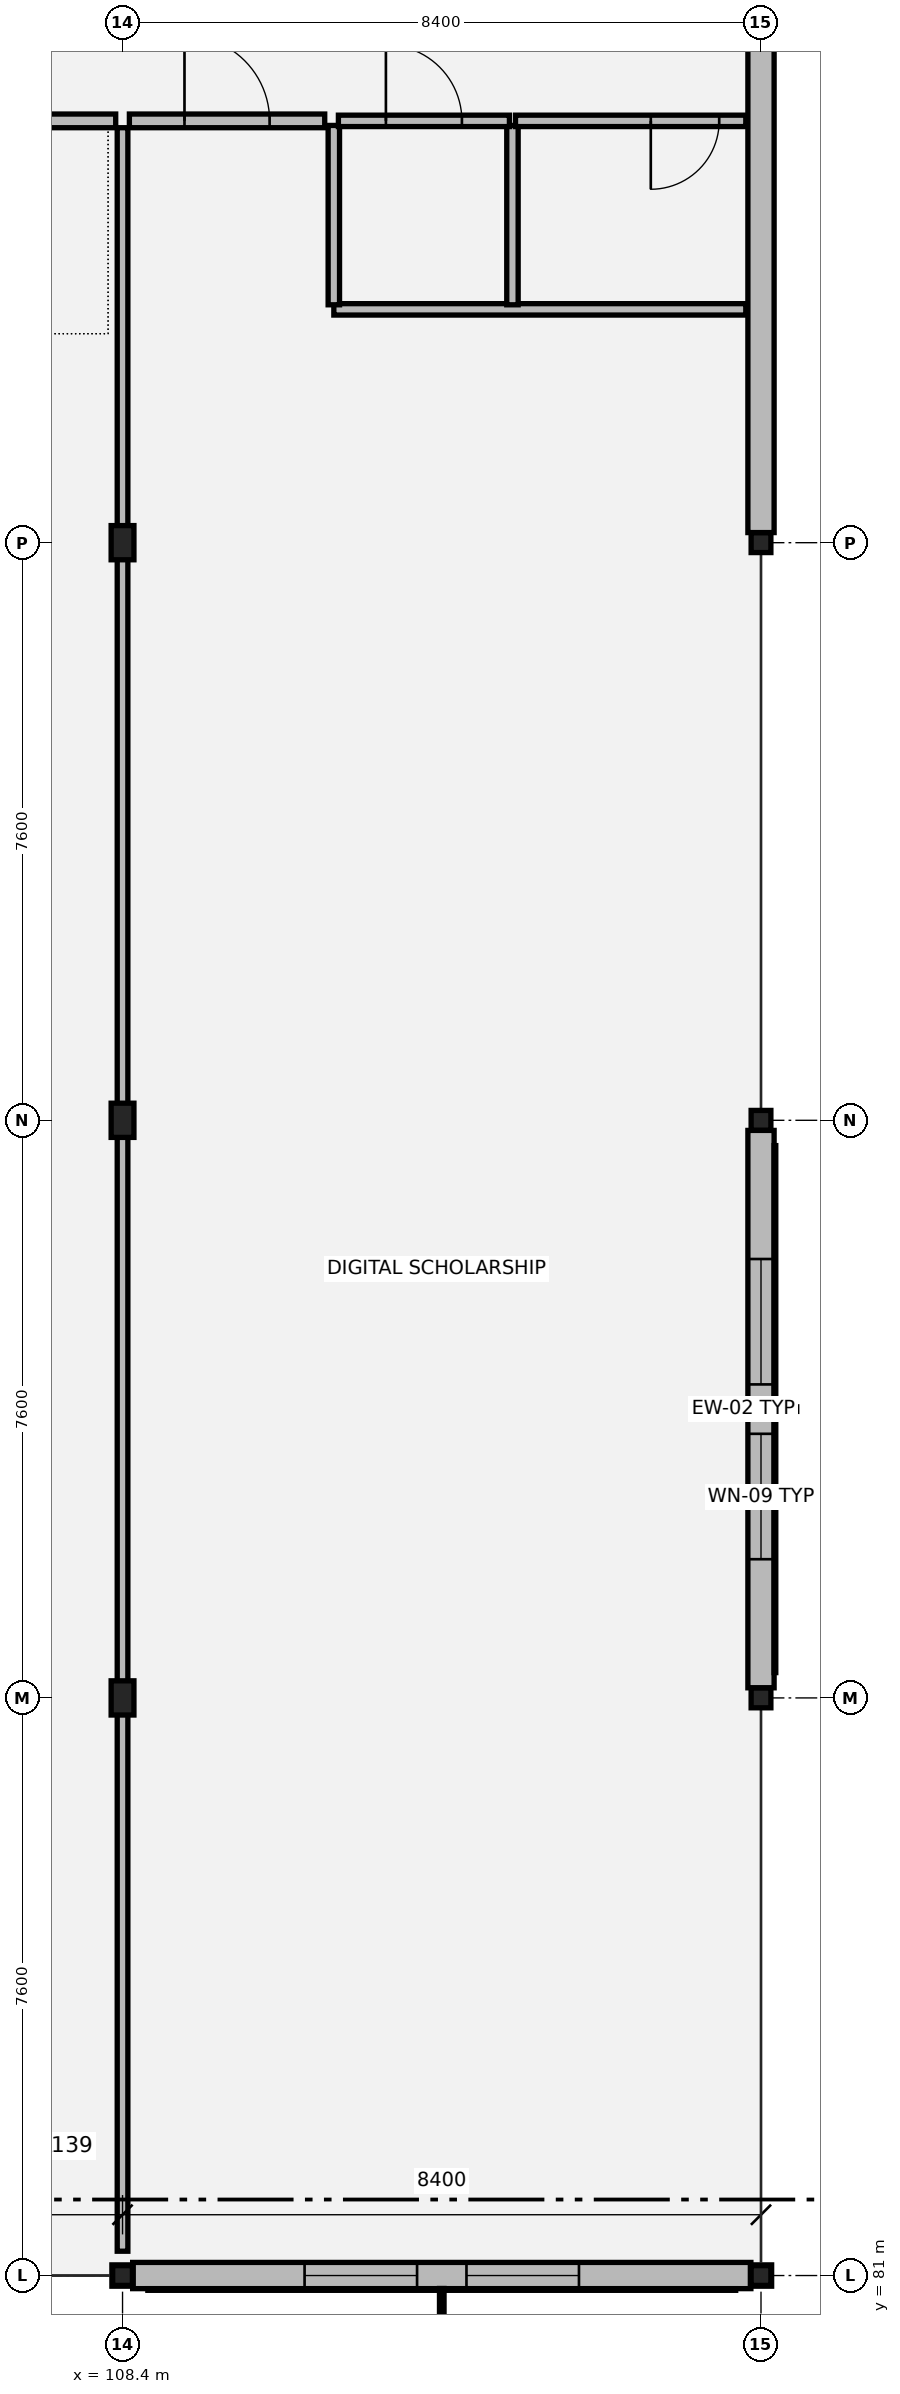
"""IFC4 building model, lengths in metres.
Left out: names, types, materials, properties, quantities, classifications, styles, units other than length and angle.
Written with IfcOpenShell. Run it as: python <this file> out.ifc"""

import sys

from ifc_helpers import new_model, si_unit, direction, frame, frame_2d, origin, origin_2d, place, context, subcontext, project, spatial, rectangle, hollow_rectangle, i_section, extrude, element, fill, save


model = new_model("IFC4")
c1 = context("Model", 3, precision=1e-05, world=origin(), true_north=direction((0.0, 1.0)))
c2 = subcontext(c1, "Body", "Model", "MODEL_VIEW")
j1 = project(units=[si_unit("LENGTHUNIT", "METRE"), si_unit("PLANEANGLEUNIT", "RADIAN")], contexts=[c1])
p1 = place(None, origin())
s1 = spatial("IfcSite", under=j1, at=p1, CompositionType="ELEMENT")
p2 = place(p1, origin())
s2 = spatial("IfcBuilding", under=s1, at=p2, CompositionType="ELEMENT")
p3 = place(p2, frame((0.0, 0.0, 9.18)))
s3 = spatial("IfcBuildingStorey", under=s2, at=p3, CompositionType="ELEMENT", Elevation=9.18)
p4 = place(p3, frame((108.4, 81.0, 0.0), z_axis=(0.0, 0.0, 1.0), x_axis=(1.0, 0.0, 0.0)))
e1 = element("IfcColumn", 1, at=p4, inside=s3, PredefinedType="COLUMN", context=c2, shape_type="SweptSolid", body=[
    extrude(hollow_rectangle(XDim=0.26, YDim=0.26, WallThickness=0.012, at=origin_2d()), origin(), (0.0, 0.0, 1.0), 3.875),
])
for number, where, z_axis, x_axis in (
    (2, (108.4, 88.6, 0.0), (0.0, 0.0, 1.0), (1.0, 0.0, 0.0)),
    (3, (108.4, 96.2, 0.0), (0.0, 0.0, 1.0), (1.0, 0.0, 0.0)),
    (4, (108.4, 103.8, 0.0), (0.0, 0.0, 1.0), (1.0, 0.0, 0.0)),
):
    element("IfcColumn", number, at=place(p3, frame(where, z_axis=z_axis, x_axis=x_axis)), inside=s3, PredefinedType="COLUMN", context=c2, shape_type="SweptSolid", body=[
        extrude(i_section(OverallWidth=0.3, OverallDepth=0.45, WebThickness=0.014, FlangeThickness=0.026, at=origin_2d()), origin(), (0.0, 0.0, 1.0), 4.055),
    ])
p5 = place(p3, frame((116.8, 81.0, 0.0), z_axis=(0.0, 0.0, 1.0), x_axis=(1.0, 0.0, 0.0)))
e5 = element("IfcColumn", 5, at=p5, inside=s3, PredefinedType="COLUMN", context=c2, shape_type="SweptSolid", body=[
    extrude(hollow_rectangle(XDim=0.26, YDim=0.26, WallThickness=0.012, at=origin_2d()), origin(), (0.0, 0.0, 1.0), 3.875),
])
for number, where, z_axis, x_axis in (
    (6, (116.8, 88.6, 0.0), (0.0, 0.0, 1.0), (1.0, 0.0, 0.0)),
    (7, (116.8, 96.2, 0.0), (0.0, 0.0, 1.0), (1.0, 0.0, 0.0)),
    (8, (116.8, 103.8, 0.0), (0.0, 0.0, 1.0), (1.0, 0.0, 0.0)),
):
    element("IfcColumn", number, at=place(p3, frame(where, z_axis=z_axis, x_axis=x_axis)), inside=s3, PredefinedType="COLUMN", context=c2, shape_type="SweptSolid", body=[
        extrude(hollow_rectangle(XDim=0.26, YDim=0.26, WallThickness=0.012, at=origin_2d()), origin(), (0.0, 0.0, 1.0), 4.055),
    ])
p6 = place(p3, frame((108.533, 81.0, 0.0), z_axis=(0.0, 0.0, 1.0), x_axis=(1.0, 0.0, 0.0)))
e9 = element("IfcWall", 9, at=p6, inside=s3, PredefinedType="SOLIDWALL", context=c2, shape_type="SweptSolid", body=[
    extrude(rectangle(XDim=8.134, YDim=0.345, at=frame_2d((4.067, 0.0))), origin(), (0.0, 0.0, 1.0), 3.48),
])
p7 = place(p6, frame((2.262, 0.0, 0.8)))
e10 = element("IfcOpeningElement", 10, at=p7, cuts=e9, PredefinedType="OPENING", context=c2, shape_type="SweptSolid", body=[
    extrude(rectangle(XDim=1.48, YDim=2.16, at=frame_2d((0.74, 1.08))), frame((0.0, 0.182, 0.0), z_axis=(0.0, -1.0, 0.0), x_axis=(1.0, 0.0, 0.0)), (0.0, 0.0, 1.0), 0.365),
])
p8 = place(p6, frame((4.392, 0.0, 0.8)))
e11 = element("IfcOpeningElement", 11, at=p8, cuts=e9, PredefinedType="OPENING", context=c2, shape_type="SweptSolid", body=[
    extrude(rectangle(XDim=1.48, YDim=2.16, at=frame_2d((0.74, 1.08))), frame((0.0, 0.182, 0.0), z_axis=(0.0, -1.0, 0.0), x_axis=(1.0, 0.0, 0.0)), (0.0, 0.0, 1.0), 0.365),
])
p9 = place(p3, frame((116.8, 88.733, 0.0), z_axis=(0.0, 0.0, 1.0), x_axis=(0.0, 1.0, 0.0)))
e12 = element("IfcWall", 12, at=p9, inside=s3, PredefinedType="SOLIDWALL", context=c2, shape_type="SweptSolid", body=[
    extrude(rectangle(XDim=7.334, YDim=0.345, at=frame_2d((3.667, 0.0))), origin(), (0.0, 0.0, 1.0), 3.48),
])
p10 = place(p9, frame((1.692, 0.0, 0.8)))
e13 = element("IfcOpeningElement", 13, at=p10, cuts=e12, PredefinedType="OPENING", context=c2, shape_type="SweptSolid", body=[
    extrude(rectangle(XDim=1.65, YDim=2.25, at=frame_2d((0.825, 1.125))), frame((0.0, 0.182, 0.0), z_axis=(0.0, -1.0, 0.0), x_axis=(1.0, 0.0, 0.0)), (0.0, 0.0, 1.0), 0.365),
])
p11 = place(p9, frame((3.992, 0.0, 0.8)))
e14 = element("IfcOpeningElement", 14, at=p11, cuts=e12, PredefinedType="OPENING", context=c2, shape_type="SweptSolid", body=[
    extrude(rectangle(XDim=1.65, YDim=2.25, at=frame_2d((0.825, 1.125))), frame((0.0, 0.182, 0.0), z_axis=(0.0, -1.0, 0.0), x_axis=(1.0, 0.0, 0.0)), (0.0, 0.0, 1.0), 0.365),
])
p12 = place(p3, frame((116.8, 103.933, 0.0), z_axis=(0.0, 0.0, 1.0), x_axis=(0.0, 1.0, 0.0)))
e15 = element("IfcWall", 15, at=p12, inside=s3, PredefinedType="SOLIDWALL", context=c2, shape_type="SweptSolid", body=[
    extrude(rectangle(XDim=7.334, YDim=0.345, at=frame_2d((3.667, 0.0))), origin(), (0.0, 0.0, 1.0), 3.48),
])
p13 = place(p3, frame((111.18, 106.87, 0.0), z_axis=(0.0, 0.0, 1.0), x_axis=(1.0, 0.0, 0.0)))
e16 = element("IfcWall", 16, at=p13, inside=s3, PredefinedType="PARTITIONING", context=c2, shape_type="SweptSolid", body=[
    extrude(rectangle(XDim=5.42, YDim=0.15, at=frame_2d((2.71, 0.0))), origin(), (0.0, 0.0, 1.0), 3.18),
])
for number, where, z_axis, x_axis in (
    (17, (111.18, 106.93, 0.0), (0.0, 0.0, 1.0), (0.0, 1.0, 0.0)),
    (18, (113.53, 106.93, 0.0), (0.0, 0.0, 1.0), (0.0, 1.0, 0.0)),
):
    element("IfcWall", number, at=place(p3, frame(where, z_axis=z_axis, x_axis=x_axis)), inside=s3, PredefinedType="PARTITIONING", context=c2, shape_type="SweptSolid", body=[
        extrude(rectangle(XDim=2.36, YDim=0.15, at=frame_2d((1.18, 0.0))), origin(), (0.0, 0.0, 1.0), 3.18),
    ])
p14 = place(p3, frame((111.24, 109.35, 0.0), z_axis=(0.0, 0.0, 1.0), x_axis=(1.0, 0.0, 0.0)))
e19 = element("IfcWall", 19, at=p14, inside=s3, PredefinedType="PARTITIONING", context=c2, shape_type="SweptSolid", body=[
    extrude(rectangle(XDim=2.25, YDim=0.15, at=frame_2d((1.125, 0.0))), origin(), (0.0, 0.0, 1.0), 3.18),
])
p15 = place(p14, frame((0.625, 0.0, 0.0)))
e20 = element("IfcOpeningElement", 20, at=p15, cuts=e19, PredefinedType="OPENING", context=c2, shape_type="SweptSolid", body=[
    extrude(rectangle(XDim=1.0, YDim=2.15, at=frame_2d((0.5, 1.075))), frame((0.0, 0.085, 0.0), z_axis=(0.0, -1.0, 0.0), x_axis=(1.0, 0.0, 0.0)), (0.0, 0.0, 1.0), 0.17),
])
p16 = place(p3, frame((113.57, 109.35, 0.0), z_axis=(0.0, 0.0, 1.0), x_axis=(1.0, 0.0, 0.0)))
e21 = element("IfcWall", 21, at=p16, inside=s3, PredefinedType="PARTITIONING", context=c2, shape_type="SweptSolid", body=[
    extrude(rectangle(XDim=3.03, YDim=0.15, at=frame_2d((1.515, 0.0))), origin(), (0.0, 0.0, 1.0), 3.18),
])
p17 = place(p16, frame((1.78, 0.0, 0.0)))
e22 = element("IfcOpeningElement", 22, at=p17, cuts=e21, PredefinedType="OPENING", context=c2, shape_type="SweptSolid", body=[
    extrude(rectangle(XDim=0.9, YDim=2.15, at=frame_2d((0.45, 1.075))), frame((0.0, 0.085, 0.0), z_axis=(0.0, -1.0, 0.0), x_axis=(1.0, 0.0, 0.0)), (0.0, 0.0, 1.0), 0.17),
])
p18 = place(p3, frame((91.69, 109.35, 0.0), z_axis=(0.0, 0.0, 1.0), x_axis=(1.0, 0.0, 0.0)))
e23 = element("IfcWall", 23, at=p18, inside=s3, PredefinedType="PARTITIONING", context=c2, shape_type="SweptSolid", body=[
    extrude(rectangle(XDim=16.62, YDim=0.18, at=frame_2d((8.31, 0.0))), origin(), (0.0, 0.0, 1.0), 3.18),
])
p19 = place(p18, frame((7.68, 0.0, 0.0)))
e24 = element("IfcOpeningElement", 24, at=p19, cuts=e23, PredefinedType="OPENING", context=c2, shape_type="SweptSolid", body=[
    extrude(rectangle(XDim=1.26, YDim=2.2, at=frame_2d((0.63, 1.1))), frame((0.0, 0.1, 0.0), z_axis=(0.0, -1.0, 0.0), x_axis=(1.0, 0.0, 0.0)), (0.0, 0.0, 1.0), 0.2),
])
p20 = place(p3, frame((108.49, 109.35, 0.0), z_axis=(0.0, 0.0, 1.0), x_axis=(1.0, 0.0, 0.0)))
e25 = element("IfcWall", 25, at=p20, inside=s3, PredefinedType="PARTITIONING", context=c2, shape_type="SweptSolid", body=[
    extrude(rectangle(XDim=2.57, YDim=0.18, at=frame_2d((1.285, 0.0))), origin(), (0.0, 0.0, 1.0), 3.18),
])
p21 = place(p20, frame((0.725, 0.0, 0.0)))
e26 = element("IfcOpeningElement", 26, at=p21, cuts=e25, PredefinedType="OPENING", context=c2, shape_type="SweptSolid", body=[
    extrude(rectangle(XDim=1.12, YDim=2.15, at=frame_2d((0.56, 1.075))), frame((0.0, 0.1, 0.0), z_axis=(0.0, -1.0, 0.0), x_axis=(1.0, 0.0, 0.0)), (0.0, 0.0, 1.0), 0.2),
])
p22 = place(p3, frame((108.4, 81.32, 0.0), z_axis=(0.0, 0.0, 1.0), x_axis=(0.0, 1.0, 0.0)))
e27 = element("IfcWall", 27, at=p22, inside=s3, PredefinedType="PARTITIONING", context=c2, shape_type="SweptSolid", body=[
    extrude(rectangle(XDim=27.94, YDim=0.14, at=frame_2d((13.97, 0.0))), origin(), (0.0, 0.0, 1.0), 3.18),
])
p23 = place(p7, origin())
e28 = element("IfcWindow", 28, at=p23, inside=s3, PartitioningType="SINGLE_PANEL", PredefinedType="WINDOW", context=c2, shape_type="SweptSolid", body=[
    extrude(rectangle(XDim=1.48, YDim=2.16, at=frame_2d((0.74, 1.08))), frame((0.0, 0.03, 0.0), z_axis=(0.0, -1.0, 0.0), x_axis=(1.0, 0.0, 0.0)), (0.0, 0.0, 1.0), 0.06),
])
fill(e10, e28)
p24 = place(p8, origin())
e29 = element("IfcWindow", 29, at=p24, inside=s3, PartitioningType="SINGLE_PANEL", PredefinedType="WINDOW", context=c2, shape_type="SweptSolid", body=[
    extrude(rectangle(XDim=1.48, YDim=2.16, at=frame_2d((0.74, 1.08))), frame((0.0, 0.03, 0.0), z_axis=(0.0, -1.0, 0.0), x_axis=(1.0, 0.0, 0.0)), (0.0, 0.0, 1.0), 0.06),
])
fill(e11, e29)
p25 = place(p10, origin())
e30 = element("IfcWindow", 30, at=p25, inside=s3, PartitioningType="SINGLE_PANEL", PredefinedType="WINDOW", context=c2, shape_type="SweptSolid", body=[
    extrude(rectangle(XDim=1.65, YDim=2.25, at=frame_2d((0.825, 1.125))), frame((0.0, 0.03, 0.0), z_axis=(0.0, -1.0, 0.0), x_axis=(1.0, 0.0, 0.0)), (0.0, 0.0, 1.0), 0.06),
])
fill(e13, e30)
p26 = place(p11, origin())
e31 = element("IfcWindow", 31, at=p26, inside=s3, PartitioningType="SINGLE_PANEL", PredefinedType="WINDOW", context=c2, shape_type="SweptSolid", body=[
    extrude(rectangle(XDim=1.65, YDim=2.25, at=frame_2d((0.825, 1.125))), frame((0.0, 0.03, 0.0), z_axis=(0.0, -1.0, 0.0), x_axis=(1.0, 0.0, 0.0)), (0.0, 0.0, 1.0), 0.06),
])
fill(e14, e31)
p27 = place(p15, origin())
e32 = element("IfcDoor", 32, at=p27, inside=s3, OperationType="SINGLE_SWING_LEFT", PredefinedType="DOOR", context=c2, shape_type="SweptSolid", body=[
    extrude(rectangle(XDim=1.0, YDim=2.15, at=frame_2d((0.5, 1.075))), frame((0.0, 0.025, 0.0), z_axis=(0.0, -1.0, 0.0), x_axis=(1.0, 0.0, 0.0)), (0.0, 0.0, 1.0), 0.05),
])
fill(e20, e32)
p28 = place(p17, origin())
e33 = element("IfcDoor", 33, at=p28, inside=s3, OperationType="SINGLE_SWING_RIGHT", PredefinedType="DOOR", context=c2, shape_type="SweptSolid", body=[
    extrude(rectangle(XDim=0.9, YDim=2.15, at=frame_2d((0.45, 1.075))), frame((0.0, 0.025, 0.0), z_axis=(0.0, -1.0, 0.0), x_axis=(1.0, 0.0, 0.0)), (0.0, 0.0, 1.0), 0.05),
])
fill(e22, e33)
p29 = place(p21, origin())
e34 = element("IfcDoor", 34, at=p29, inside=s3, OperationType="SINGLE_SWING_LEFT", PredefinedType="DOOR", context=c2, shape_type="SweptSolid", body=[
    extrude(rectangle(XDim=1.12, YDim=2.15, at=frame_2d((0.56, 1.075))), frame((0.0, 0.025, 0.0), z_axis=(0.0, -1.0, 0.0), x_axis=(1.0, 0.0, 0.0)), (0.0, 0.0, 1.0), 0.05),
])
fill(e26, e34)
save(model, sys.argv[1])
